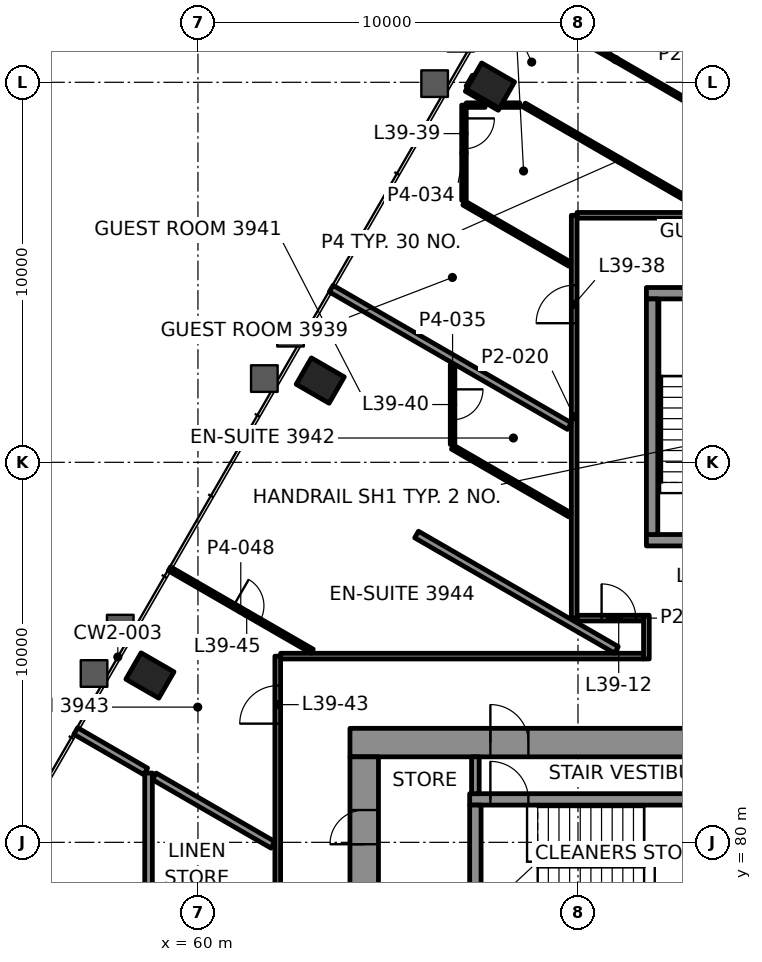
"""IFC4 building model, lengths in metres.
Left out: names, types, materials, properties, quantities, classifications, styles, units other than length and angle.
Written with IfcOpenShell. Run it as: python <this file> out.ifc"""

import sys

from ifc_helpers import new_model, si_unit, direction, frame, frame_2d, origin, origin_2d, place, context, subcontext, project, spatial, rectangle, hollow_rectangle, extrude, element, fill, save


model = new_model("IFC4")
c1 = context("Model", 3, precision=1e-05, world=origin(), true_north=direction((0.0, 1.0)))
c2 = subcontext(c1, "Body", "Model", "MODEL_VIEW")
j1 = project(units=[si_unit("LENGTHUNIT", "METRE"), si_unit("PLANEANGLEUNIT", "RADIAN")], contexts=[c1])
p1 = place(None, origin())
s1 = spatial("IfcSite", under=j1, at=p1, CompositionType="ELEMENT")
p2 = place(p1, origin())
s2 = spatial("IfcBuilding", under=s1, at=p2, CompositionType="ELEMENT")
p3 = place(p2, frame((0.0, 0.0, 171.4)))
s3 = spatial("IfcBuildingStorey", under=s2, at=p3, CompositionType="ELEMENT", Elevation=171.4)
for number, where, z_axis, x_axis in (
    (1, (67.698, 99.912, -0.0), (0.0, 0.0, 1.0), (-0.5, -0.866, 0.0)),
    (2, (63.218, 92.151, -0.0), (0.0, 0.0, 1.0), (-0.5, -0.866, 0.0)),
    (3, (58.737, 84.39, -0.0), (0.0, 0.0, 1.0), (-0.5, -0.866, 0.0)),
):
    element("IfcColumn", number, at=place(p3, frame(where, z_axis=z_axis, x_axis=x_axis)), inside=s3, PredefinedType="COLUMN", context=c2, shape_type="SweptSolid", body=[
        extrude(hollow_rectangle(XDim=0.8, YDim=1.0, WallThickness=0.05, at=origin_2d()), origin(), (0.0, 0.0, 1.0), 3.9),
    ])
p4 = place(p3, frame((64.0, 82.625, 0.0), z_axis=(0.0, 0.0, 1.0), x_axis=(1.0, 0.0, 0.0)))
e4 = element("IfcWall", 4, at=p4, inside=s3, PredefinedType="SHEAR", context=c2, shape_type="SweptSolid", body=[
    extrude(rectangle(XDim=22.0, YDim=0.75, at=frame_2d((11.0, 0.0))), origin(), (0.0, 0.0, 1.0), 3.7),
])
p5 = place(p4, frame((3.695, 0.0, 0.0)))
e5 = element("IfcOpeningElement", 5, at=p5, cuts=e4, PredefinedType="OPENING", context=c2, shape_type="SweptSolid", body=[
    extrude(rectangle(XDim=1.0, YDim=2.1, at=frame_2d((0.5, 1.05))), frame((0.0, 0.385, 0.0), z_axis=(0.0, -1.0, 0.0), x_axis=(1.0, 0.0, 0.0)), (0.0, 0.0, 1.0), 0.77),
])
p6 = place(p4, frame((17.505, 0.0, 0.0)))
e6 = element("IfcOpeningElement", 6, at=p6, cuts=e4, PredefinedType="OPENING", context=c2, shape_type="SweptSolid", body=[
    extrude(rectangle(XDim=1.0, YDim=2.1, at=frame_2d((0.5, 1.05))), frame((0.0, 0.385, 0.0), z_axis=(0.0, -1.0, 0.0), x_axis=(1.0, 0.0, 0.0)), (0.0, 0.0, 1.0), 0.77),
])
p7 = place(p4, frame((10.65, 0.0, 0.0)))
e7 = element("IfcOpeningElement", 7, at=p7, cuts=e4, PredefinedType="OPENING", context=c2, shape_type="SweptSolid", body=[
    extrude(rectangle(XDim=0.9, YDim=2.1, at=frame_2d((0.45, 1.05))), frame((0.0, 0.385, 0.0), z_axis=(0.0, -1.0, 0.0), x_axis=(1.0, 0.0, 0.0)), (0.0, 0.0, 1.0), 0.77),
])
p8 = place(p3, frame((64.375, 67.75, 0.0), z_axis=(0.0, 0.0, 1.0), x_axis=(0.0, 1.0, 0.0)))
e8 = element("IfcWall", 8, at=p8, inside=s3, PredefinedType="SHEAR", context=c2, shape_type="SweptSolid", body=[
    extrude(rectangle(XDim=14.5, YDim=0.75, at=frame_2d((7.25, 0.0))), origin(), (0.0, 0.0, 1.0), 3.7),
])
p9 = place(p8, frame((4.65, 0.0, 0.0)))
e9 = element("IfcOpeningElement", 9, at=p9, cuts=e8, PredefinedType="OPENING", context=c2, shape_type="SweptSolid", body=[
    extrude(rectangle(XDim=1.8, YDim=2.1, at=frame_2d((0.9, 1.05))), frame((0.0, 0.385, 0.0), z_axis=(0.0, -1.0, 0.0), x_axis=(1.0, 0.0, 0.0)), (0.0, 0.0, 1.0), 0.77),
])
p10 = place(p8, frame((8.5, 0.0, 0.0)))
e10 = element("IfcOpeningElement", 10, at=p10, cuts=e8, PredefinedType="OPENING", context=c2, shape_type="SweptSolid", body=[
    extrude(rectangle(XDim=0.9, YDim=2.1, at=frame_2d((0.45, 1.05))), frame((0.0, 0.385, 0.0), z_axis=(0.0, -1.0, 0.0), x_axis=(1.0, 0.0, 0.0)), (0.0, 0.0, 1.0), 0.77),
])
p11 = place(p8, frame((12.2, 0.0, 0.0)))
e11 = element("IfcOpeningElement", 11, at=p11, cuts=e8, PredefinedType="OPENING", context=c2, shape_type="SweptSolid", body=[
    extrude(rectangle(XDim=0.9, YDim=2.1, at=frame_2d((0.45, 1.05))), frame((0.0, 0.385, 0.0), z_axis=(0.0, -1.0, 0.0), x_axis=(1.0, 0.0, 0.0)), (0.0, 0.0, 1.0), 0.77),
])
p12 = place(p3, frame((67.15, 81.13, 0.0), z_axis=(0.0, 0.0, 1.0), x_axis=(1.0, 0.0, 0.0)))
e12 = element("IfcWall", 12, at=p12, inside=s3, PredefinedType="SHEAR", context=c2, shape_type="SweptSolid", body=[
    extrude(rectangle(XDim=6.91, YDim=0.3, at=frame_2d((3.455, 0.0))), origin(), (0.0, 0.0, 1.0), 3.7),
])
p13 = place(p12, frame((0.545, 0.0, 0.0)))
e13 = element("IfcOpeningElement", 13, at=p13, cuts=e12, PredefinedType="OPENING", context=c2, shape_type="SweptSolid", body=[
    extrude(rectangle(XDim=1.0, YDim=2.1, at=frame_2d((0.5, 1.05))), frame((0.0, 0.16, 0.0), z_axis=(0.0, -1.0, 0.0), x_axis=(1.0, 0.0, 0.0)), (0.0, 0.0, 1.0), 0.32),
])
p14 = place(p3, frame((67.3, 77.9, 0.0), z_axis=(0.0, 0.0, 1.0), x_axis=(0.0, 1.0, 0.0)))
e14 = element("IfcWall", 14, at=p14, inside=s3, PredefinedType="SHEAR", context=c2, shape_type="SweptSolid", body=[
    extrude(rectangle(XDim=3.08, YDim=0.3, at=frame_2d((1.54, 0.0))), origin(), (0.0, 0.0, 1.0), 3.7),
])
p15 = place(p3, frame((71.8, 87.95, 0.0), z_axis=(0.0, 0.0, 1.0), x_axis=(1.0, 0.0, 0.0)))
e15 = element("IfcWall", 15, at=p15, inside=s3, PredefinedType="SHEAR", context=c2, shape_type="SweptSolid", body=[
    extrude(rectangle(XDim=6.4, YDim=0.3, at=frame_2d((3.2, 0.0))), origin(), (0.0, 0.0, 1.0), 3.7),
])
p16 = place(p15, frame((1.325, 0.0, 0.0)))
e16 = element("IfcOpeningElement", 16, at=p16, cuts=e15, PredefinedType="OPENING", context=c2, shape_type="SweptSolid", body=[
    extrude(rectangle(XDim=1.0, YDim=2.1, at=frame_2d((0.5, 1.05))), frame((0.0, 0.16, 0.0), z_axis=(0.0, -1.0, 0.0), x_axis=(1.0, 0.0, 0.0)), (0.0, 0.0, 1.0), 0.32),
])
p17 = place(p15, frame((4.125, 0.0, 0.0)))
e17 = element("IfcOpeningElement", 17, at=p17, cuts=e15, PredefinedType="OPENING", context=c2, shape_type="SweptSolid", body=[
    extrude(rectangle(XDim=1.2, YDim=2.1, at=frame_2d((0.6, 1.05))), frame((0.0, 0.16, 0.0), z_axis=(0.0, -1.0, 0.0), x_axis=(1.0, 0.0, 0.0)), (0.0, 0.0, 1.0), 0.32),
])
p18 = place(p3, frame((71.8, 94.45, 0.0), z_axis=(0.0, 0.0, 1.0), x_axis=(1.0, 0.0, 0.0)))
e18 = element("IfcWall", 18, at=p18, inside=s3, PredefinedType="SHEAR", context=c2, shape_type="SweptSolid", body=[
    extrude(rectangle(XDim=6.4, YDim=0.3, at=frame_2d((3.2, 0.0))), origin(), (0.0, 0.0, 1.0), 3.7),
])
p19 = place(p3, frame((71.95, 88.1, 0.0), z_axis=(0.0, 0.0, 1.0), x_axis=(0.0, 1.0, 0.0)))
e19 = element("IfcWall", 19, at=p19, inside=s3, PredefinedType="SHEAR", context=c2, shape_type="SweptSolid", body=[
    extrude(rectangle(XDim=6.2, YDim=0.3, at=frame_2d((3.1, 0.0))), origin(), (0.0, 0.0, 1.0), 3.7),
])
p20 = place(p3, frame((62.176, 84.9, 0.0), z_axis=(0.0, 0.0, 1.0), x_axis=(1.0, 0.0, 0.0)))
e20 = element("IfcWall", 20, at=p20, inside=s3, PredefinedType="PARTITIONING", context=c2, shape_type="SweptSolid", body=[
    extrude(rectangle(XDim=9.55, YDim=0.15, at=frame_2d((4.775, 0.0))), origin(), (0.0, 0.0, 1.0), 3.1),
])
p21 = place(p3, frame((69.976, 85.9, 0.0), z_axis=(0.0, 0.0, 1.0), x_axis=(1.0, 0.0, 0.0)))
e21 = element("IfcWall", 21, at=p21, inside=s3, PredefinedType="PARTITIONING", context=c2, shape_type="SweptSolid", body=[
    extrude(rectangle(XDim=1.75, YDim=0.15, at=frame_2d((0.875, 0.0))), origin(), (0.0, 0.0, 1.0), 3.1),
])
p22 = place(p21, frame((0.646, 0.0, 0.0)))
e22 = element("IfcOpeningElement", 22, at=p22, cuts=e21, PredefinedType="OPENING", context=c2, shape_type="SweptSolid", body=[
    extrude(rectangle(XDim=0.9, YDim=2.1, at=frame_2d((0.45, 1.05))), frame((0.0, 0.085, 0.0), z_axis=(0.0, -1.0, 0.0), x_axis=(1.0, 0.0, 0.0)), (0.0, 0.0, 1.0), 0.17),
])
p23 = place(p3, frame((69.975, 96.5, 0.0), z_axis=(0.0, 0.0, 1.0), x_axis=(1.0, 0.0, 0.0)))
e23 = element("IfcWall", 23, at=p23, inside=s3, PredefinedType="PARTITIONING", context=c2, shape_type="SweptSolid", body=[
    extrude(rectangle(XDim=3.384, YDim=0.15, at=frame_2d((1.692, 0.0))), origin(), (0.0, 0.0, 1.0), 3.1),
])
p24 = place(p3, frame((67.06, 99.4, 0.0), z_axis=(0.0, 0.0, 1.0), x_axis=(1.0, 0.0, 0.0)))
e24 = element("IfcWall", 24, at=p24, inside=s3, PredefinedType="PARTITIONING", context=c2, shape_type="SweptSolid", body=[
    extrude(rectangle(XDim=0.496, YDim=0.12, at=frame_2d((0.248, 0.0))), origin(), (0.0, 0.0, 1.0), 3.022),
])
p25 = place(p3, frame((67.98, 99.4, 0.0), z_axis=(0.0, 0.0, 1.0), x_axis=(1.0, 0.0, 0.0)))
e25 = element("IfcWall", 25, at=p25, inside=s3, PredefinedType="PARTITIONING", context=c2, shape_type="SweptSolid", body=[
    extrude(rectangle(XDim=0.486, YDim=0.12, at=frame_2d((0.243, 0.0))), origin(), (0.0, 0.0, 1.0), 3.1),
])
p26 = place(p3, frame((67.1, 99.877, 0.0), z_axis=(0.0, 0.0, 1.0), x_axis=(0.500277597875, 0.865865073245, 0.0)))
e26 = element("IfcWall", 26, at=p26, inside=s3, PredefinedType="PARTITIONING", context=c2, shape_type="SweptSolid", body=[
    extrude(rectangle(XDim=0.33, YDim=0.1, at=frame_2d((0.165, 0.0))), origin(), (0.0, 0.0, 1.0), 3.1),
])
p27 = place(p3, frame((71.8, 84.825, 0.0), z_axis=(0.0, 0.0, 1.0), x_axis=(0.0, 1.0, 0.0)))
e27 = element("IfcWall", 27, at=p27, inside=s3, PredefinedType="PARTITIONING", context=c2, shape_type="SweptSolid", body=[
    extrude(rectangle(XDim=1.15, YDim=0.15, at=frame_2d((0.575, 0.0))), origin(), (0.0, 0.0, 1.0), 3.1),
])
p28 = place(p3, frame((69.9, 85.9, 0.0), z_axis=(0.0, 0.0, 1.0), x_axis=(0.0, 1.0, 0.0)))
e28 = element("IfcWall", 28, at=p28, inside=s3, PredefinedType="PARTITIONING", context=c2, shape_type="SweptSolid", body=[
    extrude(rectangle(XDim=10.6, YDim=0.15, at=frame_2d((5.3, 0.0))), origin(), (0.0, 0.0, 1.0), 3.022),
])
p29 = place(p28, frame((7.76, 0.0, 0.0)))
e29 = element("IfcOpeningElement", 29, at=p29, cuts=e28, PredefinedType="OPENING", context=c2, shape_type="SweptSolid", body=[
    extrude(rectangle(XDim=1.0, YDim=2.1, at=frame_2d((0.5, 1.05))), frame((0.0, 0.085, 0.0), z_axis=(0.0, -1.0, 0.0), x_axis=(1.0, 0.0, 0.0)), (0.0, 0.0, 1.0), 0.17),
])
p30 = place(p3, frame((67.0, 99.4, 0.0), z_axis=(0.0, 0.0, 1.0), x_axis=(0.0, -1.0, 0.0)))
e30 = element("IfcWall", 30, at=p30, inside=s3, PredefinedType="PARTITIONING", context=c2, shape_type="SweptSolid", body=[
    extrude(rectangle(XDim=2.508, YDim=0.12, at=frame_2d((1.254, 0.0))), origin(), (0.0, 0.0, 1.0), 3.022),
])
p31 = place(p30, frame((0.35, 0.0, 0.0)))
e31 = element("IfcOpeningElement", 31, at=p31, cuts=e30, PredefinedType="OPENING", context=c2, shape_type="SweptSolid", body=[
    extrude(rectangle(XDim=0.8, YDim=2.1, at=frame_2d((0.4, 1.05))), frame((0.0, 0.07, 0.0), z_axis=(0.0, -1.0, 0.0), x_axis=(1.0, 0.0, 0.0)), (0.0, 0.0, 1.0), 0.14),
])
p32 = place(p3, frame((66.7, 92.572, 0.0), z_axis=(0.0, 0.0, 1.0), x_axis=(0.0, -1.0, 0.0)))
e32 = element("IfcWall", 32, at=p32, inside=s3, PredefinedType="PARTITIONING", context=c2, shape_type="SweptSolid", body=[
    extrude(rectangle(XDim=2.104, YDim=0.12, at=frame_2d((1.052, 0.0))), origin(), (0.0, 0.0, 1.0), 3.1),
])
p33 = place(p32, frame((0.652, 0.0, 0.0)))
e33 = element("IfcOpeningElement", 33, at=p33, cuts=e32, PredefinedType="OPENING", context=c2, shape_type="SweptSolid", body=[
    extrude(rectangle(XDim=0.8, YDim=2.1, at=frame_2d((0.4, 1.05))), frame((0.0, 0.07, 0.0), z_axis=(0.0, -1.0, 0.0), x_axis=(1.0, 0.0, 0.0)), (0.0, 0.0, 1.0), 0.14),
])
p34 = place(p3, frame((62.1, 68.591, 0.0), z_axis=(0.0, 0.0, 1.0), x_axis=(0.0, 1.0, 0.0)))
e34 = element("IfcWall", 34, at=p34, inside=s3, PredefinedType="PARTITIONING", context=c2, shape_type="SweptSolid", body=[
    extrude(rectangle(XDim=16.308, YDim=0.15, at=frame_2d((8.154, 0.0))), origin(), (0.0, 0.0, 1.0), 3.1),
])
p35 = place(p34, frame((4.999, 0.0, 0.0)))
e35 = element("IfcOpeningElement", 35, at=p35, cuts=e34, PredefinedType="OPENING", context=c2, shape_type="SweptSolid", body=[
    extrude(rectangle(XDim=0.9, YDim=2.1, at=frame_2d((0.45, 1.05))), frame((0.0, 0.085, 0.0), z_axis=(0.0, -1.0, 0.0), x_axis=(1.0, 0.0, 0.0)), (0.0, 0.0, 1.0), 0.17),
])
p36 = place(p34, frame((8.879, 0.0, 0.0)))
e36 = element("IfcOpeningElement", 36, at=p36, cuts=e34, PredefinedType="OPENING", context=c2, shape_type="SweptSolid", body=[
    extrude(rectangle(XDim=0.9, YDim=2.1, at=frame_2d((0.45, 1.05))), frame((0.0, 0.085, 0.0), z_axis=(0.0, -1.0, 0.0), x_axis=(1.0, 0.0, 0.0)), (0.0, 0.0, 1.0), 0.17),
])
p37 = place(p34, frame((14.532, 0.0, 0.0)))
e37 = element("IfcOpeningElement", 37, at=p37, cuts=e34, PredefinedType="OPENING", context=c2, shape_type="SweptSolid", body=[
    extrude(rectangle(XDim=1.0, YDim=2.1, at=frame_2d((0.5, 1.05))), frame((0.0, 0.085, 0.0), z_axis=(0.0, -1.0, 0.0), x_axis=(1.0, 0.0, 0.0)), (0.0, 0.0, 1.0), 0.17),
])
p38 = place(p3, frame((58.7, 74.063, 0.0), z_axis=(0.0, 0.0, 1.0), x_axis=(0.0, 1.0, 0.0)))
e38 = element("IfcWall", 38, at=p38, inside=s3, PredefinedType="PARTITIONING", context=c2, shape_type="SweptSolid", body=[
    extrude(rectangle(XDim=7.76, YDim=0.2, at=frame_2d((3.88, 0.0))), origin(), (0.0, 0.0, 1.0), 3.1),
])
p39 = place(p3, frame((73.999, 98.862, 0.0), z_axis=(0.0, 0.0, 1.0), x_axis=(-0.866026860931, 0.49999747614, 0.0)))
e39 = element("IfcWall", 39, at=p39, inside=s3, PredefinedType="PARTITIONING", context=c2, shape_type="SweptSolid", body=[
    extrude(rectangle(XDim=6.941, YDim=0.1, at=frame_2d((3.471, 0.0))), origin(), (0.0, 0.0, 1.0), 3.1),
])
p40 = place(p3, frame((73.609, 96.5, 0.0), z_axis=(0.0, 0.0, 1.0), x_axis=(-0.866032775405, 0.499987231761, 0.0)))
e40 = element("IfcWall", 40, at=p40, inside=s3, PredefinedType="PARTITIONING", context=c2, shape_type="SweptSolid", body=[
    extrude(rectangle(XDim=5.8, YDim=0.12, at=frame_2d((2.9, 0.0))), origin(), (0.0, 0.0, 1.0), 3.1),
])
p41 = place(p3, frame((67.932, 99.316, 0.0), z_axis=(0.0, 0.0, 1.0), x_axis=(-0.866010750942, 0.50002537861, 0.0)))
e41 = element("IfcWall", 41, at=p41, inside=s3, PredefinedType="PARTITIONING", context=c2, shape_type="SweptSolid", body=[
    extrude(rectangle(XDim=1.0, YDim=0.12, at=frame_2d((0.5, 0.0))), origin(), (0.0, 0.0, 1.0), 3.022),
])
p42 = place(p3, frame((69.79, 95.212, 0.0), z_axis=(0.0, 0.0, 1.0), x_axis=(-0.86604299788, 0.499969524894, 0.0)))
e42 = element("IfcWall", 42, at=p42, inside=s3, PredefinedType="PARTITIONING", context=c2, shape_type="SweptSolid", body=[
    extrude(rectangle(XDim=3.222, YDim=0.12, at=frame_2d((1.611, 0.0))), origin(), (0.0, 0.0, 1.0), 3.1),
])
p43 = place(p3, frame((69.773, 90.953, 0.0), z_axis=(0.0, 0.0, 1.0), x_axis=(-0.866025463095, 0.499999897272, 0.0)))
e43 = element("IfcWall", 43, at=p43, inside=s3, PredefinedType="PARTITIONING", context=c2, shape_type="SweptSolid", body=[
    extrude(rectangle(XDim=7.236, YDim=0.2, at=frame_2d((3.618, 0.0))), origin(), (0.0, 0.0, 1.0), 3.022),
])
p44 = place(p3, frame((69.791, 88.615, 0.0), z_axis=(0.0, 0.0, 1.0), x_axis=(-0.866045460162, 0.499965259726, 0.0)))
e44 = element("IfcWall", 44, at=p44, inside=s3, PredefinedType="PARTITIONING", context=c2, shape_type="SweptSolid", body=[
    extrude(rectangle(XDim=3.569, YDim=0.12, at=frame_2d((1.784, 0.0))), origin(), (0.0, 0.0, 1.0), 3.1),
])
p45 = place(p3, frame((71.01, 85.065, 0.0), z_axis=(0.0, 0.0, 1.0), x_axis=(-0.866024161028, 0.500002152512, 0.0)))
e45 = element("IfcWall", 45, at=p45, inside=s3, PredefinedType="PARTITIONING", context=c2, shape_type="SweptSolid", body=[
    extrude(rectangle(XDim=6.07, YDim=0.2, at=frame_2d((3.035, 0.0))), origin(), (0.0, 0.0, 1.0), 3.1),
])
p46 = place(p3, frame((59.249, 87.198, 0.0), z_axis=(0.0, 0.0, 1.0), x_axis=(0.866006496088, -0.50003274766, 0.0)))
e46 = element("IfcWall", 46, at=p46, inside=s3, PredefinedType="PARTITIONING", context=c2, shape_type="SweptSolid", body=[
    extrude(rectangle(XDim=4.336, YDim=0.12, at=frame_2d((2.168, 0.0))), origin(), (0.0, 0.0, 1.0), 3.022),
])
p47 = place(p46, frame((1.948, 0.0, 0.0)))
e47 = element("IfcOpeningElement", 47, at=p47, cuts=e46, PredefinedType="OPENING", context=c2, shape_type="SweptSolid", body=[
    extrude(rectangle(XDim=0.8, YDim=2.1, at=frame_2d((0.4, 1.05))), frame((0.0, 0.07, 0.0), z_axis=(0.0, -1.0, 0.0), x_axis=(1.0, 0.0, 0.0)), (0.0, 0.0, 1.0), 0.14),
])
p48 = place(p3, frame((61.973, 79.934, 0.0), z_axis=(0.0, 0.0, 1.0), x_axis=(-0.866022099498, 0.500005723148, 0.0)))
e48 = element("IfcWall", 48, at=p48, inside=s3, PredefinedType="PARTITIONING", context=c2, shape_type="SweptSolid", body=[
    extrude(rectangle(XDim=3.606, YDim=0.2, at=frame_2d((1.803, 0.0))), origin(), (0.0, 0.0, 1.0), 3.1),
])
p49 = place(p3, frame((58.625, 81.867, 0.0), z_axis=(0.0, 0.0, 1.0), x_axis=(-0.866078449842, 0.499908110276, 0.0)))
e49 = element("IfcWall", 49, at=p49, inside=s3, PredefinedType="PARTITIONING", context=c2, shape_type="SweptSolid", body=[
    extrude(rectangle(XDim=2.125, YDim=0.2, at=frame_2d((1.062, 0.0))), origin(), (0.0, 0.0, 1.0), 3.022),
])
p50 = place(p3, frame((67.3, 81.28, 0.0), z_axis=(0.0, 0.0, 1.0), x_axis=(0.0, 1.0, 0.0)))
e50 = element("IfcWall", 50, at=p50, inside=s3, PredefinedType="PARTITIONING", context=c2, shape_type="SweptSolid", body=[
    extrude(rectangle(XDim=0.97, YDim=0.2, at=frame_2d((0.485, 0.0))), origin(), (0.0, 0.0, 1.0), 3.7),
])
p51 = place(p22, origin())
e51 = element("IfcDoor", 51, at=p51, inside=s3, OperationType="SINGLE_SWING_RIGHT", PredefinedType="DOOR", context=c2, shape_type="SweptSolid", body=[
    extrude(rectangle(XDim=0.9, YDim=2.1, at=frame_2d((0.45, 1.05))), frame((0.0, 0.025, 0.0), z_axis=(0.0, -1.0, 0.0), x_axis=(1.0, 0.0, 0.0)), (0.0, 0.0, 1.0), 0.05),
])
fill(e22, e51)
p52 = place(p29, origin())
e52 = element("IfcDoor", 52, at=p52, inside=s3, OperationType="SINGLE_SWING_RIGHT", PredefinedType="DOOR", context=c2, shape_type="SweptSolid", body=[
    extrude(rectangle(XDim=1.0, YDim=2.1, at=frame_2d((0.5, 1.05))), frame((0.0, 0.025, 0.0), z_axis=(0.0, -1.0, 0.0), x_axis=(1.0, 0.0, 0.0)), (0.0, 0.0, 1.0), 0.05),
])
fill(e29, e52)
p53 = place(p31, origin())
e53 = element("IfcDoor", 53, at=p53, inside=s3, OperationType="SINGLE_SWING_RIGHT", PredefinedType="DOOR", context=c2, shape_type="SweptSolid", body=[
    extrude(rectangle(XDim=0.8, YDim=2.1, at=frame_2d((0.4, 1.05))), frame((0.0, 0.025, 0.0), z_axis=(0.0, -1.0, 0.0), x_axis=(1.0, 0.0, 0.0)), (0.0, 0.0, 1.0), 0.05),
])
fill(e31, e53)
p54 = place(p33, origin())
e54 = element("IfcDoor", 54, at=p54, inside=s3, OperationType="SINGLE_SWING_RIGHT", PredefinedType="DOOR", context=c2, shape_type="SweptSolid", body=[
    extrude(rectangle(XDim=0.8, YDim=2.1, at=frame_2d((0.4, 1.05))), frame((0.0, 0.025, 0.0), z_axis=(0.0, -1.0, 0.0), x_axis=(1.0, 0.0, 0.0)), (0.0, 0.0, 1.0), 0.05),
])
fill(e33, e54)
p55 = place(p37, origin())
e55 = element("IfcDoor", 55, at=p55, inside=s3, OperationType="SINGLE_SWING_RIGHT", PredefinedType="DOOR", context=c2, shape_type="SweptSolid", body=[
    extrude(rectangle(XDim=1.0, YDim=2.1, at=frame_2d((0.5, 1.05))), frame((0.0, 0.025, 0.0), z_axis=(0.0, -1.0, 0.0), x_axis=(1.0, 0.0, 0.0)), (0.0, 0.0, 1.0), 0.05),
])
fill(e37, e55)
p56 = place(p47, origin())
e56 = element("IfcDoor", 56, at=p56, inside=s3, OperationType="SINGLE_SWING_RIGHT", PredefinedType="DOOR", context=c2, shape_type="SweptSolid", body=[
    extrude(rectangle(XDim=0.8, YDim=2.1, at=frame_2d((0.4, 1.05))), frame((0.0, 0.025, 0.0), z_axis=(0.0, -1.0, 0.0), x_axis=(1.0, 0.0, 0.0)), (0.0, 0.0, 1.0), 0.05),
])
fill(e47, e56)
p57 = place(p13, origin())
e57 = element("IfcDoor", 57, at=p57, inside=s3, OperationType="SINGLE_SWING_RIGHT", PredefinedType="DOOR", context=c2, shape_type="SweptSolid", body=[
    extrude(rectangle(XDim=1.0, YDim=2.1, at=frame_2d((0.5, 1.05))), frame((0.0, 0.025, 0.0), z_axis=(0.0, -1.0, 0.0), x_axis=(1.0, 0.0, 0.0)), (0.0, 0.0, 1.0), 0.05),
])
fill(e13, e57)
p58 = place(p5, origin())
e58 = element("IfcDoor", 58, at=p58, inside=s3, OperationType="SINGLE_SWING_LEFT", PredefinedType="DOOR", context=c2, shape_type="SweptSolid", body=[
    extrude(rectangle(XDim=1.0, YDim=2.1, at=frame_2d((0.5, 1.05))), frame((0.0, 0.095, 0.0), z_axis=(0.0, -1.0, 0.0), x_axis=(1.0, 0.0, 0.0)), (0.0, 0.0, 1.0), 0.19),
])
fill(e5, e58)
p59 = place(p11, origin())
e59 = element("IfcDoor", 59, at=p59, inside=s3, OperationType="SINGLE_SWING_LEFT", PredefinedType="DOOR", context=c2, shape_type="SweptSolid", body=[
    extrude(rectangle(XDim=0.9, YDim=2.1, at=frame_2d((0.45, 1.05))), frame((0.0, 0.095, 0.0), z_axis=(0.0, -1.0, 0.0), x_axis=(1.0, 0.0, 0.0)), (0.0, 0.0, 1.0), 0.19),
])
fill(e11, e59)
save(model, sys.argv[1])
